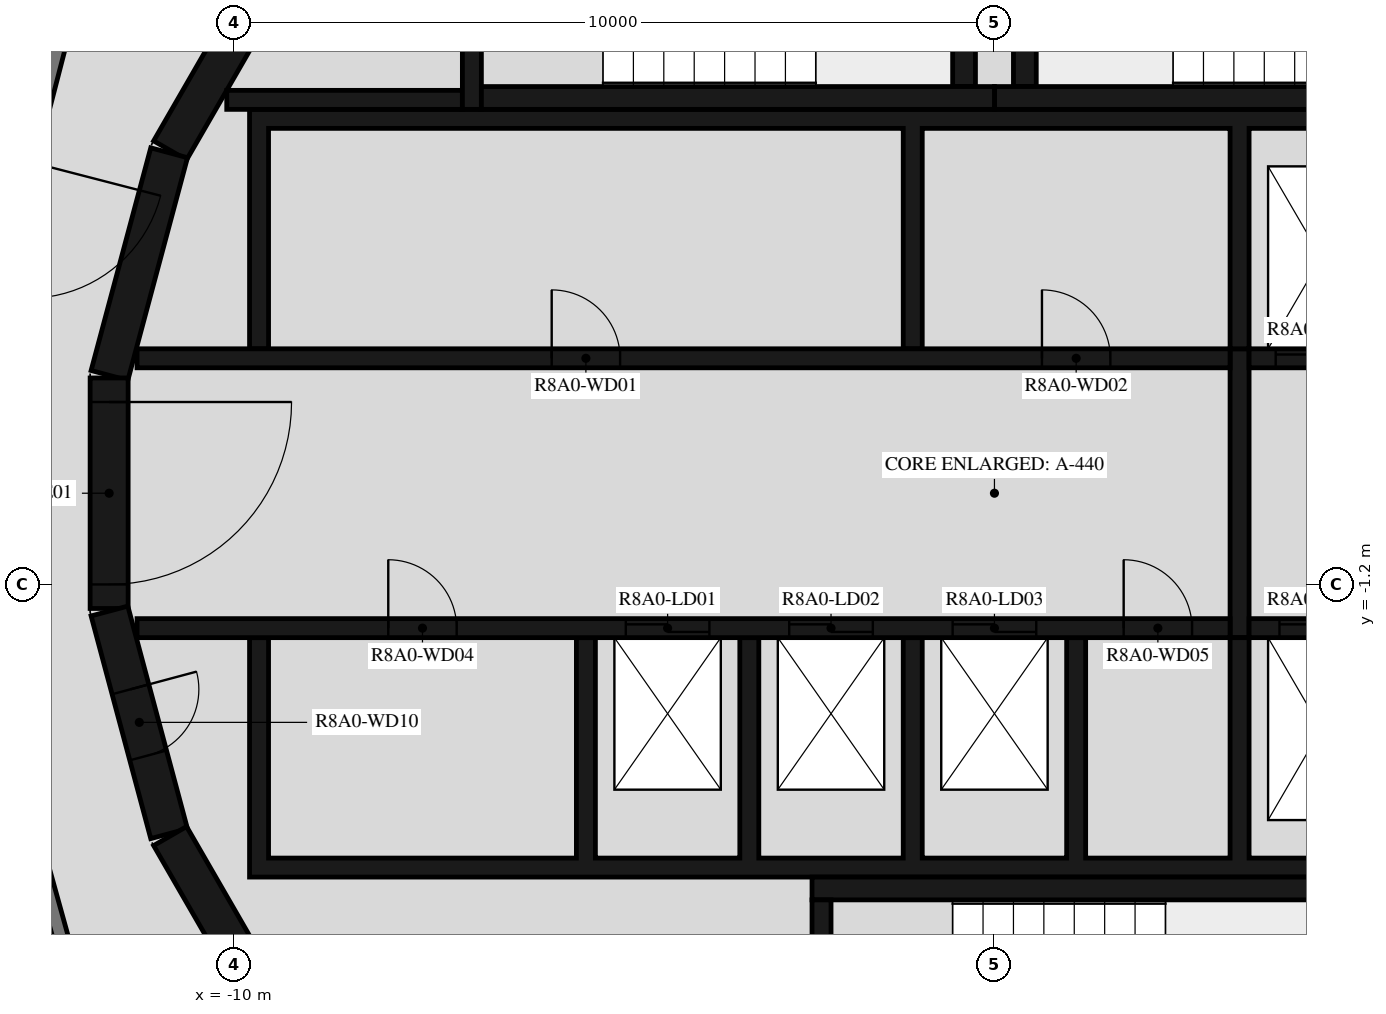
"""IFC4 building model, lengths in metres.
Left out: names, types, materials, properties, quantities, classifications, styles, units other than length and angle.
Written with IfcOpenShell. Run it as: python <this file> out.ifc"""

import sys

from ifc_helpers import new_model, si_unit, direction, frame, frame_2d, origin, place, context, subcontext, project, spatial, polyline, rectangle, outline, extrude, element, fill, save


model = new_model("IFC4")
c1 = context("Model", 3, precision=1e-05, world=origin(), true_north=direction((0.0, 1.0)))
c2 = subcontext(c1, "Body", "Model", "MODEL_VIEW")
j1 = project(units=[si_unit("LENGTHUNIT", "METRE"), si_unit("PLANEANGLEUNIT", "RADIAN")], contexts=[c1])
p1 = place(None, origin())
s1 = spatial("IfcSite", under=j1, at=p1, CompositionType="ELEMENT")
p2 = place(p1, origin())
s2 = spatial("IfcBuilding", under=s1, at=p2, CompositionType="ELEMENT")
p3 = place(p2, frame((0.0, 0.0, 298.2)))
s3 = spatial("IfcBuildingStorey", under=s2, at=p3, CompositionType="ELEMENT", Elevation=298.2)
for number, where, z_axis, x_axis in (
    (1, (-9.329, 7.137, 0.0), (0.0, 0.0, 1.0), (-0.5, -0.866, 0.0)),
    (2, (-10.858, 4.479, 0.0), (0.0, 0.0, 1.0), (-0.259, -0.966, 0.0)),
):
    element("IfcWall", number, at=place(p3, frame(where, z_axis=z_axis, x_axis=x_axis)), inside=s3, PredefinedType="SHEAR", context=c2, shape_type="SweptSolid", body=[
        extrude(rectangle(XDim=3.033, YDim=0.5, at=frame_2d((1.516, 0.0))), origin(), (0.0, 0.0, 1.0), 3.12),
    ])
p4 = place(p3, frame((-11.647, 1.516, 0.0), z_axis=(0.0, 0.0, 1.0), x_axis=(0.0, -1.0, 0.0)))
e3 = element("IfcWall", 3, at=p4, inside=s3, PredefinedType="SHEAR", context=c2, shape_type="SweptSolid", body=[
    extrude(rectangle(XDim=3.033, YDim=0.5, at=frame_2d((1.516, 0.0))), origin(), (0.0, 0.0, 1.0), 3.12),
])
p5 = place(p4, frame((0.316, 0.0, 0.0)))
e4 = element("IfcOpeningElement", 4, at=p5, cuts=e3, PredefinedType="OPENING", context=c2, shape_type="SweptSolid", body=[
    extrude(rectangle(XDim=2.4, YDim=2.1, at=frame_2d((1.2, 1.05))), frame((0.0, 0.26, 0.0), z_axis=(0.0, -1.0, 0.0), x_axis=(1.0, 0.0, 0.0)), (0.0, 0.0, 1.0), 0.52),
])
p6 = place(p3, frame((-11.643, -1.55, 0.0), z_axis=(0.0, 0.0, 1.0), x_axis=(0.258734743916, -0.965948410781, 0.0)))
e5 = element("IfcWall", 5, at=p6, inside=s3, PredefinedType="SHEAR", context=c2, shape_type="SweptSolid", body=[
    extrude(rectangle(XDim=3.033, YDim=0.5, at=frame_2d((1.516, 0.0))), origin(), (0.0, 0.0, 1.0), 3.12),
])
p7 = place(p6, frame((1.066, 0.0, 0.0)))
e6 = element("IfcOpeningElement", 6, at=p7, cuts=e5, PredefinedType="OPENING", context=c2, shape_type="SweptSolid", body=[
    extrude(rectangle(XDim=0.9, YDim=2.1, at=frame_2d((0.45, 1.05))), frame((0.0, 0.26, 0.0), z_axis=(0.0, -1.0, 0.0), x_axis=(1.0, 0.0, 0.0)), (0.0, 0.0, 1.0), 0.52),
])
p8 = place(p3, frame((-10.845, -4.51, 0.0), z_axis=(0.0, 0.0, 1.0), x_axis=(0.500087131594, -0.865975092491, 0.0)))
e7 = element("IfcWall", 7, at=p8, inside=s3, PredefinedType="SHEAR", context=c2, shape_type="SweptSolid", body=[
    extrude(rectangle(XDim=3.033, YDim=0.5, at=frame_2d((1.516, 0.0))), origin(), (0.0, 0.0, 1.0), 3.12),
])
p9 = place(p3, frame((0.0, 5.2, 0.0), z_axis=(0.0, 0.0, 1.0), x_axis=(1.0, 0.0, 0.0)))
e8 = element("IfcWall", 8, at=p9, inside=s3, PredefinedType="SHEAR", context=c2, shape_type="SweptSolid", body=[
    extrude(rectangle(XDim=6.75, YDim=0.3, at=frame_2d((3.375, 0.0))), origin(), (0.0, 0.0, 1.0), 3.12),
])
p10 = place(p3, frame((0.4, 5.35, 0.0), z_axis=(0.0, 0.0, 1.0), x_axis=(0.0, 1.0, 0.0)))
e9 = element("IfcWall", 9, at=p10, inside=s3, PredefinedType="SHEAR", context=c2, shape_type="SweptSolid", body=[
    extrude(rectangle(XDim=3.32, YDim=0.3, at=frame_2d((1.66, 0.0))), origin(), (0.0, 0.0, 1.0), 3.12),
])
p11 = place(p3, frame((-6.75, 5.2, 0.0), z_axis=(0.0, 0.0, 1.0), x_axis=(1.0, 0.0, 0.0)))
e10 = element("IfcWall", 10, at=p11, inside=s3, PredefinedType="SHEAR", context=c2, shape_type="SweptSolid", body=[
    extrude(rectangle(XDim=6.75, YDim=0.3, at=frame_2d((3.375, 0.0))), origin(), (0.0, 0.0, 1.0), 3.12),
])
p12 = place(p3, frame((-0.4, 5.35, 0.0), z_axis=(0.0, 0.0, 1.0), x_axis=(0.0, 1.0, 0.0)))
e11 = element("IfcWall", 11, at=p12, inside=s3, PredefinedType="SHEAR", context=c2, shape_type="SweptSolid", body=[
    extrude(rectangle(XDim=3.32, YDim=0.3, at=frame_2d((1.66, 0.0))), origin(), (0.0, 0.0, 1.0), 3.12),
])
p13 = place(p3, frame((-6.875, 8.97, 0.0), z_axis=(0.0, 0.0, 1.0), x_axis=(0.0, -1.0, 0.0)))
e12 = element("IfcWall", 12, at=p13, inside=s3, PredefinedType="SHEAR", context=c2, shape_type="SweptSolid", body=[
    extrude(rectangle(XDim=3.92, YDim=0.25, at=frame_2d((1.96, 0.0))), origin(), (0.0, 0.0, 1.0), 3.12),
])
p14 = place(p13, frame((1.61, 0.0, 0.0)))
e13 = element("IfcOpeningElement", 13, at=p14, cuts=e12, PredefinedType="OPENING", context=c2, shape_type="SweptSolid", body=[
    extrude(rectangle(XDim=1.2, YDim=2.1, at=frame_2d((0.6, 1.05))), frame((0.0, 0.135, 0.0), z_axis=(0.0, -1.0, 0.0), x_axis=(1.0, 0.0, 0.0)), (0.0, 0.0, 1.0), 0.27),
])
p15 = place(p3, frame((-7.0, 5.175, 0.0), z_axis=(0.0, 0.0, 1.0), x_axis=(-1.0, 0.0, 0.0)))
e14 = element("IfcWall", 14, at=p15, inside=s3, PredefinedType="SHEAR", context=c2, shape_type="SweptSolid", body=[
    extrude(rectangle(XDim=3.1, YDim=0.25, at=frame_2d((1.55, 0.0))), origin(), (0.0, 0.0, 1.0), 3.12),
])
p16 = place(p3, frame((-2.275, -8.67, 0.0), z_axis=(0.0, 0.0, 1.0), x_axis=(0.0, 1.0, 0.0)))
e15 = element("IfcWall", 15, at=p16, inside=s3, PredefinedType="SHEAR", context=c2, shape_type="SweptSolid", body=[
    extrude(rectangle(XDim=3.32, YDim=0.25, at=frame_2d((1.66, 0.0))), origin(), (0.0, 0.0, 1.0), 3.12),
])
p17 = place(p3, frame((-2.4, -5.2, 0.0), z_axis=(0.0, 0.0, 1.0), x_axis=(1.0, 0.0, 0.0)))
e16 = element("IfcWall", 16, at=p17, inside=s3, PredefinedType="SHEAR", context=c2, shape_type="SweptSolid", body=[
    extrude(rectangle(XDim=7.05, YDim=0.3, at=frame_2d((3.525, 0.0))), origin(), (0.0, 0.0, 1.0), 3.12),
])
p18 = place(p3, origin())
e17 = element("IfcWall", 17, at=p18, inside=s3, PredefinedType="SHEAR", context=c2, shape_type="SweptSolid", body=[
    extrude(outline(polyline([(-9.8, 1.9), (-9.55, 1.9), (-9.55, 4.8), (-1.2, 4.8), (-1.2, 1.9), (-0.95, 1.9), (-0.95, 4.8), (3.1, 4.8), (3.1, 1.9), (3.35, 1.9), (3.35, 4.8), (5.25, 4.8), (5.25, 1.9), (5.5, 1.9), (5.5, 4.8), (7.4, 4.8), (7.4, 1.9), (7.65, 1.9), (7.65, 4.8), (9.55, 4.8), (9.55, 1.9), (9.8, 1.9), (9.8, 4.8), (9.8, 5.05), (-9.8, 5.05), (-9.8, 4.8), (-9.8, 1.9)])), origin(), (0.0, 0.0, 1.0), 3.12),
])
p19 = place(p3, origin())
e18 = element("IfcWall", 18, at=p19, inside=s3, PredefinedType="SHEAR", context=c2, shape_type="SweptSolid", body=[
    extrude(outline(polyline([(9.8, -5.05), (9.8, -4.8), (9.8, -1.9), (9.55, -1.9), (9.55, -4.8), (7.65, -4.8), (7.65, -1.9), (7.4, -1.9), (7.4, -4.8), (5.5, -4.8), (5.5, -1.9), (5.25, -1.9), (5.25, -4.8), (3.35, -4.8), (3.35, -1.9), (3.1, -1.9), (3.1, -4.8), (1.2, -4.8), (1.2, -1.9), (0.95, -1.9), (0.95, -4.8), (-0.95, -4.8), (-0.95, -1.9), (-1.2, -1.9), (-1.2, -4.8), (-3.1, -4.8), (-3.1, -1.9), (-3.35, -1.9), (-3.35, -4.8), (-5.25, -4.8), (-5.25, -1.9), (-5.5, -1.9), (-5.5, -4.8), (-9.55, -4.8), (-9.55, -1.9), (-9.8, -1.9), (-9.8, -4.8), (-9.8, -5.05), (9.8, -5.05)])), origin(), (0.0, 0.0, 1.0), 3.12),
])
p20 = place(p3, frame((-11.28, 1.775, 0.0), z_axis=(0.0, 0.0, 1.0), x_axis=(1.0, 0.0, 0.0)))
e19 = element("IfcWall", 19, at=p20, inside=s3, PredefinedType="SHEAR", context=c2, shape_type="SweptSolid", body=[
    extrude(rectangle(XDim=14.38, YDim=0.25, at=frame_2d((7.19, 0.0))), origin(), (0.0, 0.0, 1.0), 3.12),
])
p21 = place(p20, frame((5.455, 0.0, 0.0)))
e20 = element("IfcOpeningElement", 20, at=p21, cuts=e19, PredefinedType="OPENING", context=c2, shape_type="SweptSolid", body=[
    extrude(rectangle(XDim=0.9, YDim=2.1, at=frame_2d((0.45, 1.05))), frame((0.0, 0.135, 0.0), z_axis=(0.0, -1.0, 0.0), x_axis=(1.0, 0.0, 0.0)), (0.0, 0.0, 1.0), 0.27),
])
p22 = place(p20, frame((11.905, 0.0, 0.0)))
e21 = element("IfcOpeningElement", 21, at=p22, cuts=e19, PredefinedType="OPENING", context=c2, shape_type="SweptSolid", body=[
    extrude(rectangle(XDim=0.9, YDim=2.1, at=frame_2d((0.45, 1.05))), frame((0.0, 0.135, 0.0), z_axis=(0.0, -1.0, 0.0), x_axis=(1.0, 0.0, 0.0)), (0.0, 0.0, 1.0), 0.27),
])
p23 = place(p3, frame((3.35, 1.775, 0.0), z_axis=(0.0, 0.0, 1.0), x_axis=(1.0, 0.0, 0.0)))
e22 = element("IfcWall", 22, at=p23, inside=s3, PredefinedType="SHEAR", context=c2, shape_type="SweptSolid", body=[
    extrude(rectangle(XDim=7.93, YDim=0.25, at=frame_2d((3.965, 0.0))), origin(), (0.0, 0.0, 1.0), 3.12),
])
p24 = place(p23, frame((0.35, 0.0, 0.0)))
e23 = element("IfcOpeningElement", 23, at=p24, cuts=e22, PredefinedType="OPENING", context=c2, shape_type="SweptSolid", body=[
    extrude(rectangle(XDim=1.2, YDim=2.4, at=frame_2d((0.6, 1.2))), frame((0.0, 0.135, 0.0), z_axis=(0.0, -1.0, 0.0), x_axis=(1.0, 0.0, 0.0)), (0.0, 0.0, 1.0), 0.27),
])
p25 = place(p23, frame((2.5, 0.0, 0.0)))
e24 = element("IfcOpeningElement", 24, at=p25, cuts=e22, PredefinedType="OPENING", context=c2, shape_type="SweptSolid", body=[
    extrude(rectangle(XDim=1.2, YDim=2.4, at=frame_2d((0.6, 1.2))), frame((0.0, 0.135, 0.0), z_axis=(0.0, -1.0, 0.0), x_axis=(1.0, 0.0, 0.0)), (0.0, 0.0, 1.0), 0.27),
])
p26 = place(p23, frame((4.8, 0.0, 0.0)))
e25 = element("IfcOpeningElement", 25, at=p26, cuts=e22, PredefinedType="OPENING", context=c2, shape_type="SweptSolid", body=[
    extrude(rectangle(XDim=0.9, YDim=2.1, at=frame_2d((0.45, 1.05))), frame((0.0, 0.135, 0.0), z_axis=(0.0, -1.0, 0.0), x_axis=(1.0, 0.0, 0.0)), (0.0, 0.0, 1.0), 0.27),
])
p27 = place(p3, frame((-11.28, -1.775, 0.0), z_axis=(0.0, 0.0, 1.0), x_axis=(1.0, 0.0, 0.0)))
e26 = element("IfcWall", 26, at=p27, inside=s3, PredefinedType="SHEAR", context=c2, shape_type="SweptSolid", body=[
    extrude(rectangle(XDim=14.38, YDim=0.25, at=frame_2d((7.19, 0.0))), origin(), (0.0, 0.0, 1.0), 3.12),
])
p28 = place(p27, frame((6.43, 0.0, 0.0)))
e27 = element("IfcOpeningElement", 27, at=p28, cuts=e26, PredefinedType="OPENING", context=c2, shape_type="SweptSolid", body=[
    extrude(rectangle(XDim=1.1, YDim=2.1, at=frame_2d((0.55, 1.05))), frame((0.0, 0.135, 0.0), z_axis=(0.0, -1.0, 0.0), x_axis=(1.0, 0.0, 0.0)), (0.0, 0.0, 1.0), 0.27),
])
p29 = place(p27, frame((8.58, 0.0, 0.0)))
e28 = element("IfcOpeningElement", 28, at=p29, cuts=e26, PredefinedType="OPENING", context=c2, shape_type="SweptSolid", body=[
    extrude(rectangle(XDim=1.1, YDim=2.1, at=frame_2d((0.55, 1.05))), frame((0.0, 0.135, 0.0), z_axis=(0.0, -1.0, 0.0), x_axis=(1.0, 0.0, 0.0)), (0.0, 0.0, 1.0), 0.27),
])
p30 = place(p27, frame((10.73, 0.0, 0.0)))
e29 = element("IfcOpeningElement", 29, at=p30, cuts=e26, PredefinedType="OPENING", context=c2, shape_type="SweptSolid", body=[
    extrude(rectangle(XDim=1.1, YDim=2.1, at=frame_2d((0.55, 1.05))), frame((0.0, 0.135, 0.0), z_axis=(0.0, -1.0, 0.0), x_axis=(1.0, 0.0, 0.0)), (0.0, 0.0, 1.0), 0.27),
])
p31 = place(p27, frame((3.305, 0.0, 0.0)))
e30 = element("IfcOpeningElement", 30, at=p31, cuts=e26, PredefinedType="OPENING", context=c2, shape_type="SweptSolid", body=[
    extrude(rectangle(XDim=0.9, YDim=2.1, at=frame_2d((0.45, 1.05))), frame((0.0, 0.135, 0.0), z_axis=(0.0, -1.0, 0.0), x_axis=(1.0, 0.0, 0.0)), (0.0, 0.0, 1.0), 0.27),
])
p32 = place(p27, frame((12.98, 0.0, 0.0)))
e31 = element("IfcOpeningElement", 31, at=p32, cuts=e26, PredefinedType="OPENING", context=c2, shape_type="SweptSolid", body=[
    extrude(rectangle(XDim=0.9, YDim=2.1, at=frame_2d((0.45, 1.05))), frame((0.0, 0.135, 0.0), z_axis=(0.0, -1.0, 0.0), x_axis=(1.0, 0.0, 0.0)), (0.0, 0.0, 1.0), 0.27),
])
p33 = place(p3, frame((3.35, -1.775, 0.0), z_axis=(0.0, 0.0, 1.0), x_axis=(1.0, 0.0, 0.0)))
e32 = element("IfcWall", 32, at=p33, inside=s3, PredefinedType="SHEAR", context=c2, shape_type="SweptSolid", body=[
    extrude(rectangle(XDim=7.93, YDim=0.25, at=frame_2d((3.965, 0.0))), origin(), (0.0, 0.0, 1.0), 3.12),
])
p34 = place(p33, frame((0.4, 0.0, 0.0)))
e33 = element("IfcOpeningElement", 33, at=p34, cuts=e32, PredefinedType="OPENING", context=c2, shape_type="SweptSolid", body=[
    extrude(rectangle(XDim=1.1, YDim=2.4, at=frame_2d((0.55, 1.2))), frame((0.0, 0.135, 0.0), z_axis=(0.0, -1.0, 0.0), x_axis=(1.0, 0.0, 0.0)), (0.0, 0.0, 1.0), 0.27),
])
p35 = place(p33, frame((2.55, 0.0, 0.0)))
e34 = element("IfcOpeningElement", 34, at=p35, cuts=e32, PredefinedType="OPENING", context=c2, shape_type="SweptSolid", body=[
    extrude(rectangle(XDim=1.1, YDim=2.4, at=frame_2d((0.55, 1.2))), frame((0.0, 0.135, 0.0), z_axis=(0.0, -1.0, 0.0), x_axis=(1.0, 0.0, 0.0)), (0.0, 0.0, 1.0), 0.27),
])
p36 = place(p33, frame((4.7, 0.0, 0.0)))
e35 = element("IfcOpeningElement", 35, at=p36, cuts=e32, PredefinedType="OPENING", context=c2, shape_type="SweptSolid", body=[
    extrude(rectangle(XDim=1.1, YDim=2.4, at=frame_2d((0.55, 1.2))), frame((0.0, 0.135, 0.0), z_axis=(0.0, -1.0, 0.0), x_axis=(1.0, 0.0, 0.0)), (0.0, 0.0, 1.0), 0.27),
])
p37 = place(p3, frame((3.225, -1.9, 0.0), z_axis=(0.0, 0.0, 1.0), x_axis=(0.0, 1.0, 0.0)))
e36 = element("IfcWall", 36, at=p37, inside=s3, PredefinedType="SHEAR", context=c2, shape_type="SweptSolid", body=[
    extrude(rectangle(XDim=3.8, YDim=0.25, at=frame_2d((1.9, 0.0))), origin(), (0.0, 0.0, 1.0), 3.12),
])
p38 = place(p3, frame((-12.074, 6.831, 0.0), z_axis=(0.0, 0.0, 1.0), x_axis=(-0.250391063186, -0.968144780225, 0.0)))
e37 = element("IfcWall", 37, at=p38, inside=s3, PredefinedType="STANDARD", context=c2, shape_type="SweptSolid", body=[
    extrude(rectangle(XDim=7.181, YDim=0.2, at=frame_2d((3.591, 0.0))), origin(), (0.0, 0.0, 1.0), 3.12),
])
p39 = place(p38, frame((2.548, 0.0, 0.0)))
e38 = element("IfcOpeningElement", 38, at=p39, cuts=e37, PredefinedType="OPENING", context=c2, shape_type="SweptSolid", body=[
    extrude(rectangle(XDim=1.8, YDim=2.1, at=frame_2d((0.9, 1.05))), frame((0.0, 0.11, 0.0), z_axis=(0.0, -1.0, 0.0), x_axis=(1.0, 0.0, 0.0)), (0.0, 0.0, 1.0), 0.22),
])
p40 = place(p3, frame((-13.872, -0.121, 0.0), z_axis=(0.0, 0.0, 1.0), x_axis=(0.267254575108, -0.963625960674, 0.0)))
e39 = element("IfcWall", 39, at=p40, inside=s3, PredefinedType="STANDARD", context=c2, shape_type="SweptSolid", body=[
    extrude(rectangle(XDim=7.181, YDim=0.2, at=frame_2d((3.591, 0.0))), origin(), (0.0, 0.0, 1.0), 3.12),
])
p41 = place(p5, origin())
e40 = element("IfcDoor", 40, at=p41, inside=s3, OperationType="DOUBLE_DOOR_SINGLE_SWING", PredefinedType="DOOR", context=c2, shape_type="SweptSolid", body=[
    extrude(rectangle(XDim=2.4, YDim=2.1, at=frame_2d((1.2, 1.05))), frame((0.0, 0.025, 0.0), z_axis=(0.0, -1.0, 0.0), x_axis=(1.0, 0.0, 0.0)), (0.0, 0.0, 1.0), 0.05),
])
fill(e4, e40)
p42 = place(p24, origin())
e41 = element("IfcDoor", 41, at=p42, inside=s3, OperationType="DOUBLE_DOOR_SLIDING", PredefinedType="DOOR", context=c2, shape_type="SweptSolid", body=[
    extrude(rectangle(XDim=1.2, YDim=2.4, at=frame_2d((0.6, 1.2))), frame((0.0, 0.025, 0.0), z_axis=(0.0, -1.0, 0.0), x_axis=(1.0, 0.0, 0.0)), (0.0, 0.0, 1.0), 0.05),
])
fill(e23, e41)
p43 = place(p28, origin())
e42 = element("IfcDoor", 42, at=p43, inside=s3, OperationType="DOUBLE_DOOR_SLIDING", PredefinedType="DOOR", context=c2, shape_type="SweptSolid", body=[
    extrude(rectangle(XDim=1.1, YDim=2.1, at=frame_2d((0.55, 1.05))), frame((0.0, 0.025, 0.0), z_axis=(0.0, -1.0, 0.0), x_axis=(1.0, 0.0, 0.0)), (0.0, 0.0, 1.0), 0.05),
])
fill(e27, e42)
p44 = place(p29, origin())
e43 = element("IfcDoor", 43, at=p44, inside=s3, OperationType="DOUBLE_DOOR_SLIDING", PredefinedType="DOOR", context=c2, shape_type="SweptSolid", body=[
    extrude(rectangle(XDim=1.1, YDim=2.1, at=frame_2d((0.55, 1.05))), frame((0.0, 0.025, 0.0), z_axis=(0.0, -1.0, 0.0), x_axis=(1.0, 0.0, 0.0)), (0.0, 0.0, 1.0), 0.05),
])
fill(e28, e43)
p45 = place(p30, origin())
e44 = element("IfcDoor", 44, at=p45, inside=s3, OperationType="DOUBLE_DOOR_SLIDING", PredefinedType="DOOR", context=c2, shape_type="SweptSolid", body=[
    extrude(rectangle(XDim=1.1, YDim=2.1, at=frame_2d((0.55, 1.05))), frame((0.0, 0.025, 0.0), z_axis=(0.0, -1.0, 0.0), x_axis=(1.0, 0.0, 0.0)), (0.0, 0.0, 1.0), 0.05),
])
fill(e29, e44)
p46 = place(p34, origin())
e45 = element("IfcDoor", 45, at=p46, inside=s3, OperationType="DOUBLE_DOOR_SLIDING", PredefinedType="DOOR", context=c2, shape_type="SweptSolid", body=[
    extrude(rectangle(XDim=1.1, YDim=2.4, at=frame_2d((0.55, 1.2))), frame((0.0, 0.025, 0.0), z_axis=(0.0, -1.0, 0.0), x_axis=(1.0, 0.0, 0.0)), (0.0, 0.0, 1.0), 0.05),
])
fill(e33, e45)
p47 = place(p21, origin())
e46 = element("IfcDoor", 46, at=p47, inside=s3, OperationType="SINGLE_SWING_LEFT", PredefinedType="DOOR", context=c2, shape_type="SweptSolid", body=[
    extrude(rectangle(XDim=0.9, YDim=2.1, at=frame_2d((0.45, 1.05))), frame((0.0, 0.025, 0.0), z_axis=(0.0, -1.0, 0.0), x_axis=(1.0, 0.0, 0.0)), (0.0, 0.0, 1.0), 0.05),
])
fill(e20, e46)
p48 = place(p22, origin())
e47 = element("IfcDoor", 47, at=p48, inside=s3, OperationType="SINGLE_SWING_RIGHT", PredefinedType="DOOR", context=c2, shape_type="SweptSolid", body=[
    extrude(rectangle(XDim=0.9, YDim=2.1, at=frame_2d((0.45, 1.05))), frame((0.0, 0.025, 0.0), z_axis=(0.0, -1.0, 0.0), x_axis=(1.0, 0.0, 0.0)), (0.0, 0.0, 1.0), 0.05),
])
fill(e21, e47)
p49 = place(p31, origin())
e48 = element("IfcDoor", 48, at=p49, inside=s3, OperationType="SINGLE_SWING_RIGHT", PredefinedType="DOOR", context=c2, shape_type="SweptSolid", body=[
    extrude(rectangle(XDim=0.9, YDim=2.1, at=frame_2d((0.45, 1.05))), frame((0.0, 0.025, 0.0), z_axis=(0.0, -1.0, 0.0), x_axis=(1.0, 0.0, 0.0)), (0.0, 0.0, 1.0), 0.05),
])
fill(e30, e48)
p50 = place(p32, origin())
e49 = element("IfcDoor", 49, at=p50, inside=s3, OperationType="SINGLE_SWING_LEFT", PredefinedType="DOOR", context=c2, shape_type="SweptSolid", body=[
    extrude(rectangle(XDim=0.9, YDim=2.1, at=frame_2d((0.45, 1.05))), frame((0.0, 0.025, 0.0), z_axis=(0.0, -1.0, 0.0), x_axis=(1.0, 0.0, 0.0)), (0.0, 0.0, 1.0), 0.05),
])
fill(e31, e49)
p51 = place(p7, origin())
e50 = element("IfcDoor", 50, at=p51, inside=s3, OperationType="SINGLE_SWING_RIGHT", PredefinedType="DOOR", context=c2, shape_type="SweptSolid", body=[
    extrude(rectangle(XDim=0.9, YDim=2.1, at=frame_2d((0.45, 1.05))), frame((0.0, 0.025, 0.0), z_axis=(0.0, -1.0, 0.0), x_axis=(1.0, 0.0, 0.0)), (0.0, 0.0, 1.0), 0.05),
])
fill(e6, e50)
save(model, sys.argv[1])
